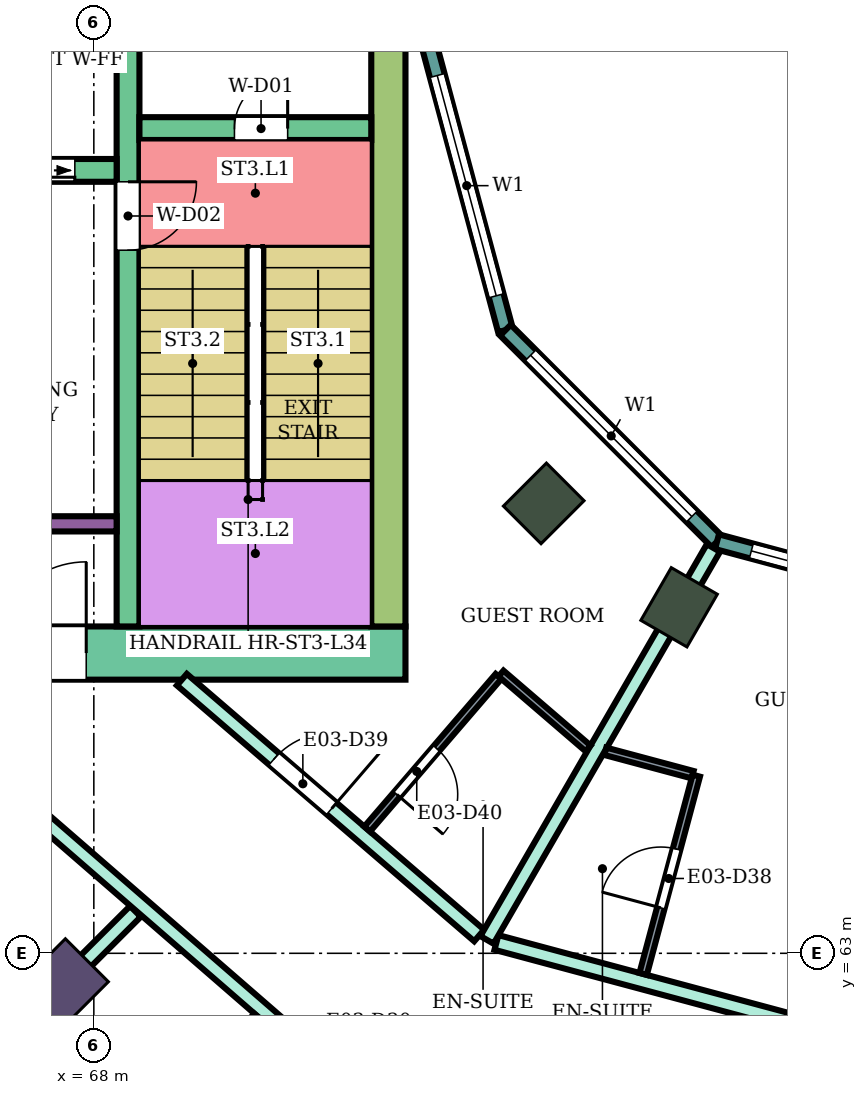
"""IFC4 building model, lengths in metres.
Left out: names, types, materials, properties, quantities, classifications, styles, units other than length and angle.
Written with IfcOpenShell. Run it as: python <this file> out.ifc"""

import sys

from ifc_helpers import new_model, si_unit, direction, frame, frame_2d, origin, origin_2d, place, context, subcontext, project, spatial, rectangle, extrude, element, fill, save


model = new_model("IFC4")
c1 = context("Model", 3, precision=1e-05, world=origin(), true_north=direction((0.0, 1.0)))
c2 = subcontext(c1, "Body", "Model", "MODEL_VIEW")
j1 = project(units=[si_unit("LENGTHUNIT", "METRE"), si_unit("PLANEANGLEUNIT", "RADIAN")], contexts=[c1])
p1 = place(None, origin())
s1 = spatial("IfcSite", under=j1, at=p1, CompositionType="ELEMENT")
p2 = place(p1, origin())
s2 = spatial("IfcBuilding", under=s1, at=p2, CompositionType="ELEMENT")
p3 = place(p2, frame((0.0, 0.0, 145.8)))
s3 = spatial("IfcBuildingStorey", under=s2, at=p3, CompositionType="ELEMENT", Elevation=145.8)
p4 = place(p3, frame((67.555, 62.555, 0.0), z_axis=(0.0, 0.0, 1.0), x_axis=(-0.707106781187, -0.707106781187, 0.0)))
e1 = element("IfcColumn", 1, at=p4, inside=s3, PredefinedType="COLUMN", context=c2, shape_type="SweptSolid", body=[
    extrude(rectangle(XDim=1.0, YDim=0.8, at=origin_2d()), origin(), (0.0, 0.0, 1.0), 3.9),
])
for number, where, z_axis, x_axis in (
    (2, (73.919, 68.919, 0.0), (0.0, 0.0, 1.0), (-0.707, -0.707, 0.0)),
    (3, (75.7, 67.552, 0.0), (0.0, 0.0, 1.0), (-0.5, -0.866, 0.0)),
):
    element("IfcColumn", number, at=place(p3, frame(where, z_axis=z_axis, x_axis=x_axis)), inside=s3, PredefinedType="COLUMN", context=c2, shape_type="SweptSolid", body=[
        extrude(rectangle(XDim=0.8, YDim=0.7, at=origin_2d()), origin(), (0.0, 0.0, 1.0), 3.9),
    ])
p5 = place(p3, frame((72.1, 66.95, 0.0), z_axis=(0.0, 0.0, 1.0), x_axis=(-1.0, 0.0, 0.0)))
e4 = element("IfcWall", 4, at=p5, inside=s3, PredefinedType="SHEAR", context=c2, shape_type="SweptSolid", body=[
    extrude(rectangle(XDim=14.8, YDim=0.7, at=frame_2d((7.4, 0.0))), origin(), (0.0, 0.0, 1.0), 3.5),
])
p6 = place(p5, frame((4.2, 0.0, 0.0)))
e5 = element("IfcOpeningElement", 5, at=p6, cuts=e4, PredefinedType="OPENING", context=c2, shape_type="SweptSolid", body=[
    extrude(rectangle(XDim=2.4, YDim=2.4, at=frame_2d((1.2, 1.2))), frame((0.0, 0.36, 0.0), z_axis=(0.0, -1.0, 0.0), x_axis=(1.0, 0.0, 0.0)), (0.0, 0.0, 1.0), 0.72),
])
p7 = place(p3, frame((71.875, 75.0, 0.0), z_axis=(0.0, 0.0, 1.0), x_axis=(0.0, -1.0, 0.0)))
e6 = element("IfcWall", 6, at=p7, inside=s3, PredefinedType="SHEAR", context=c2, shape_type="SweptSolid", body=[
    extrude(rectangle(XDim=7.7, YDim=0.45, at=frame_2d((3.85, 0.0))), origin(), (0.0, 0.0, 1.0), 3.5),
])
p8 = place(p3, frame((68.45, 75.0, 0.0), z_axis=(0.0, 0.0, 1.0), x_axis=(0.0, -1.0, 0.0)))
e7 = element("IfcWall", 7, at=p8, inside=s3, PredefinedType="SHEAR", context=c2, shape_type="SweptSolid", body=[
    extrude(rectangle(XDim=7.7, YDim=0.3, at=frame_2d((3.85, 0.0))), origin(), (0.0, 0.0, 1.0), 3.5),
])
p9 = place(p8, frame((1.85, 0.0, 0.0)))
e8 = element("IfcOpeningElement", 8, at=p9, cuts=e7, PredefinedType="OPENING", context=c2, shape_type="SweptSolid", body=[
    extrude(rectangle(XDim=0.9, YDim=2.1, at=frame_2d((0.45, 1.05))), frame((0.0, 0.16, 0.0), z_axis=(0.0, -1.0, 0.0), x_axis=(1.0, 0.0, 0.0)), (0.0, 0.0, 1.0), 0.32),
])
p10 = place(p3, frame((71.65, 73.85, 0.0), z_axis=(0.0, 0.0, 1.0), x_axis=(-1.0, 0.0, 0.0)))
e9 = element("IfcWall", 9, at=p10, inside=s3, PredefinedType="SHEAR", context=c2, shape_type="SweptSolid", body=[
    extrude(rectangle(XDim=3.05, YDim=0.3, at=frame_2d((1.525, 0.0))), origin(), (0.0, 0.0, 1.0), 3.5),
])
p11 = place(p10, frame((1.1, 0.0, 0.0)))
e10 = element("IfcOpeningElement", 10, at=p11, cuts=e9, PredefinedType="OPENING", context=c2, shape_type="SweptSolid", body=[
    extrude(rectangle(XDim=0.7, YDim=2.0, at=frame_2d((0.35, 1.0))), frame((0.0, 0.16, 0.0), z_axis=(0.0, -1.0, 0.0), x_axis=(1.0, 0.0, 0.0)), (0.0, 0.0, 1.0), 0.32),
])
p12 = place(p3, frame((68.3, 73.3, 0.0), z_axis=(0.0, 0.0, 1.0), x_axis=(-1.0, 0.0, 0.0)))
e11 = element("IfcWall", 11, at=p12, inside=s3, PredefinedType="SHEAR", context=c2, shape_type="SweptSolid", body=[
    extrude(rectangle(XDim=11.0, YDim=0.3, at=frame_2d((5.5, 0.0))), origin(), (0.0, 0.0, 1.0), 3.5),
])
p13 = place(p12, frame((0.55, 0.0, 0.0)))
e12 = element("IfcOpeningElement", 12, at=p13, cuts=e11, PredefinedType="OPENING", context=c2, shape_type="SweptSolid", body=[
    extrude(rectangle(XDim=1.1, YDim=2.1, at=frame_2d((0.55, 1.05))), frame((0.0, 0.16, 0.0), z_axis=(0.0, -1.0, 0.0), x_axis=(1.0, 0.0, 0.0)), (0.0, 0.0, 1.0), 0.32),
])
p14 = place(p12, frame((8.1, 0.0, 0.0)))
e13 = element("IfcOpeningElement", 13, at=p14, cuts=e11, PredefinedType="OPENING", context=c2, shape_type="SweptSolid", body=[
    extrude(rectangle(XDim=1.0, YDim=2.1, at=frame_2d((0.5, 1.05))), frame((0.0, 0.16, 0.0), z_axis=(0.0, -1.0, 0.0), x_axis=(1.0, 0.0, 0.0)), (0.0, 0.0, 1.0), 0.32),
])
p15 = place(p3, frame((68.3, 68.65, 0.0), z_axis=(0.0, 0.0, 1.0), x_axis=(-1.0, 0.0, 0.0)))
e14 = element("IfcWall", 14, at=p15, inside=s3, PredefinedType="SHEAR", context=c2, shape_type="SweptSolid", body=[
    extrude(rectangle(XDim=4.5, YDim=0.2, at=frame_2d((2.25, 0.0))), origin(), (0.0, 0.0, 1.0), 3.5),
])
p16 = place(p3, frame((72.396, 75.0, 0.0), z_axis=(0.0, 0.0, 1.0), x_axis=(0.258789828301, -0.965933654434, 0.0)))
e15 = element("IfcWall", 15, at=p16, inside=s3, PredefinedType="NOTDEFINED", context=c2, shape_type="SweptSolid", body=[
    extrude(rectangle(XDim=3.936, YDim=0.2, at=frame_2d((1.968, 0.0))), origin(), (0.0, 0.0, 1.0), 3.9),
])
p17 = place(p16, frame((0.468, 0.0, 0.9)))
e16 = element("IfcOpeningElement", 16, at=p17, cuts=e15, PredefinedType="OPENING", context=c2, shape_type="SweptSolid", body=[
    extrude(rectangle(XDim=3.0, YDim=2.3, at=frame_2d((1.5, 1.15))), frame((0.0, 0.11, 0.0), z_axis=(0.0, -1.0, 0.0), x_axis=(1.0, 0.0, 0.0)), (0.0, 0.0, 1.0), 0.22),
])
p18 = place(p3, frame((73.415, 71.198, 0.0), z_axis=(0.0, 0.0, 1.0), x_axis=(0.707106781187, -0.707106781187, 0.0)))
e17 = element("IfcWall", 17, at=p18, inside=s3, PredefinedType="NOTDEFINED", context=c2, shape_type="SweptSolid", body=[
    extrude(rectangle(XDim=3.936, YDim=0.2, at=frame_2d((1.968, 0.0))), origin(), (0.0, 0.0, 1.0), 3.9),
])
p19 = place(p18, frame((0.468, 0.0, 0.9)))
e18 = element("IfcOpeningElement", 18, at=p19, cuts=e17, PredefinedType="OPENING", context=c2, shape_type="SweptSolid", body=[
    extrude(rectangle(XDim=3.0, YDim=2.3, at=frame_2d((1.5, 1.15))), frame((0.0, 0.11, 0.0), z_axis=(0.0, -1.0, 0.0), x_axis=(1.0, 0.0, 0.0)), (0.0, 0.0, 1.0), 0.22),
])
p20 = place(p3, frame((76.198, 68.415, 0.0), z_axis=(0.0, 0.0, 1.0), x_axis=(0.965933654434, -0.258789828301, 0.0)))
e19 = element("IfcWall", 19, at=p20, inside=s3, PredefinedType="NOTDEFINED", context=c2, shape_type="SweptSolid", body=[
    extrude(rectangle(XDim=3.936, YDim=0.2, at=frame_2d((1.968, 0.0))), origin(), (0.0, 0.0, 1.0), 3.9),
])
p21 = place(p20, frame((0.468, 0.0, 0.9)))
e20 = element("IfcOpeningElement", 20, at=p21, cuts=e19, PredefinedType="OPENING", context=c2, shape_type="SweptSolid", body=[
    extrude(rectangle(XDim=3.0, YDim=2.3, at=frame_2d((1.5, 1.15))), frame((0.0, 0.11, 0.0), z_axis=(0.0, -1.0, 0.0), x_axis=(1.0, 0.0, 0.0)), (0.0, 0.0, 1.0), 0.22),
])
p22 = place(p3, frame((63.593, 58.599, 0.0), z_axis=(0.0, 0.0, 1.0), x_axis=(0.707228748718, 0.706984792613, 0.0)))
e21 = element("IfcWall", 21, at=p22, inside=s3, PredefinedType="PARTITIONING", context=c2, shape_type="SweptSolid", body=[
    extrude(rectangle(XDim=7.005, YDim=0.2, at=frame_2d((3.503, 0.0))), origin(), (0.0, 0.0, 1.0), 3.45),
])
p23 = place(p3, frame((67.082, 64.972, 0.0), z_axis=(0.0, 0.0, 1.0), x_axis=(0.755031061605, -0.65568902386, 0.0)))
e22 = element("IfcWall", 22, at=p23, inside=s3, PredefinedType="PARTITIONING", context=c2, shape_type="SweptSolid", body=[
    extrude(rectangle(XDim=6.186, YDim=0.2, at=frame_2d((3.093, 0.0))), origin(), (0.0, 0.0, 1.0), 3.45),
])
p24 = place(p23, frame((4.755, 0.0, 0.0)))
e23 = element("IfcOpeningElement", 23, at=p24, cuts=e22, PredefinedType="OPENING", context=c2, shape_type="SweptSolid", body=[
    extrude(rectangle(XDim=1.0, YDim=2.1, at=frame_2d((0.5, 1.05))), frame((0.0, 0.11, 0.0), z_axis=(0.0, -1.0, 0.0), x_axis=(1.0, 0.0, 0.0)), (0.0, 0.0, 1.0), 0.22),
])
p25 = place(p3, frame((69.158, 66.6, 0.0), z_axis=(0.0, 0.0, 1.0), x_axis=(0.757976058094, -0.652282373943, 0.0)))
e24 = element("IfcWall", 24, at=p25, inside=s3, PredefinedType="PARTITIONING", context=c2, shape_type="SweptSolid", body=[
    extrude(rectangle(XDim=5.16, YDim=0.2, at=frame_2d((2.58, 0.0))), origin(), (0.0, 0.0, 1.0), 3.45),
])
p26 = place(p25, frame((1.6, 0.0, 0.0)))
e25 = element("IfcOpeningElement", 25, at=p26, cuts=e24, PredefinedType="OPENING", context=c2, shape_type="SweptSolid", body=[
    extrude(rectangle(XDim=1.0, YDim=2.1, at=frame_2d((0.5, 1.05))), frame((0.0, 0.11, 0.0), z_axis=(0.0, -1.0, 0.0), x_axis=(1.0, 0.0, 0.0)), (0.0, 0.0, 1.0), 0.22),
])
p27 = place(p3, frame((73.297, 63.143, 0.0), z_axis=(0.0, 0.0, 1.0), x_axis=(0.965859030528, -0.25906820173, 0.0)))
e26 = element("IfcWall", 26, at=p27, inside=s3, PredefinedType="PARTITIONING", context=c2, shape_type="SweptSolid", body=[
    extrude(rectangle(XDim=6.81, YDim=0.2, at=frame_2d((3.405, 0.0))), origin(), (0.0, 0.0, 1.0), 3.45),
])
p28 = place(p27, frame((5.39, 0.0, 0.0)))
e27 = element("IfcOpeningElement", 27, at=p28, cuts=e26, PredefinedType="OPENING", context=c2, shape_type="SweptSolid", body=[
    extrude(rectangle(XDim=1.0, YDim=2.1, at=frame_2d((0.5, 1.05))), frame((0.0, 0.11, 0.0), z_axis=(0.0, -1.0, 0.0), x_axis=(1.0, 0.0, 0.0)), (0.0, 0.0, 1.0), 0.22),
])
p29 = place(p3, frame((73.173, 63.176, 0.0), z_axis=(0.0, 0.0, 1.0), x_axis=(0.500239348149, 0.865887171959, 0.0)))
e28 = element("IfcWall", 28, at=p29, inside=s3, PredefinedType="PARTITIONING", context=c2, shape_type="SweptSolid", body=[
    extrude(rectangle(XDim=5.955, YDim=0.2, at=frame_2d((2.978, 0.0))), origin(), (0.0, 0.0, 1.0), 3.45),
])
p30 = place(p3, frame((65.208, 62.875, 0.0), z_axis=(0.0, 0.0, 1.0), x_axis=(0.757943251005, -0.652320495045, 0.0)))
e29 = element("IfcWall", 29, at=p30, inside=s3, PredefinedType="PARTITIONING", context=c2, shape_type="SweptSolid", body=[
    extrude(rectangle(XDim=4.151, YDim=0.1, at=frame_2d((2.076, 0.0))), origin(), (0.0, 0.0, 1.0), 3.45),
])
p31 = place(p3, frame((68.393, 60.135, 0.0), z_axis=(0.0, 0.0, 1.0), x_axis=(0.652061182569, 0.758166349944, 0.0)))
e30 = element("IfcWall", 30, at=p31, inside=s3, PredefinedType="PARTITIONING", context=c2, shape_type="SweptSolid", body=[
    extrude(rectangle(XDim=2.69, YDim=0.1, at=frame_2d((1.345, 0.0))), origin(), (0.0, 0.0, 1.0), 3.45),
])
p32 = place(p31, frame((1.0, 0.0, 0.0)))
e31 = element("IfcOpeningElement", 31, at=p32, cuts=e30, PredefinedType="OPENING", context=c2, shape_type="SweptSolid", body=[
    extrude(rectangle(XDim=0.8, YDim=2.1, at=frame_2d((0.4, 1.05))), frame((0.0, 0.06, 0.0), z_axis=(0.0, -1.0, 0.0), x_axis=(1.0, 0.0, 0.0)), (0.0, 0.0, 1.0), 0.12),
])
p33 = place(p3, frame((71.596, 64.635, 0.0), z_axis=(0.0, 0.0, 1.0), x_axis=(0.652285007511, 0.757973791748, 0.0)))
e32 = element("IfcWall", 32, at=p33, inside=s3, PredefinedType="PARTITIONING", context=c2, shape_type="SweptSolid", body=[
    extrude(rectangle(XDim=2.65, YDim=0.1, at=frame_2d((1.325, 0.0))), origin(), (0.0, 0.0, 1.0), 3.45),
])
p34 = place(p33, frame((0.6, 0.0, 0.0)))
e33 = element("IfcOpeningElement", 33, at=p34, cuts=e32, PredefinedType="OPENING", context=c2, shape_type="SweptSolid", body=[
    extrude(rectangle(XDim=0.8, YDim=2.1, at=frame_2d((0.4, 1.05))), frame((0.0, 0.06, 0.0), z_axis=(0.0, -1.0, 0.0), x_axis=(1.0, 0.0, 0.0)), (0.0, 0.0, 1.0), 0.12),
])
p35 = place(p3, frame((73.357, 66.681, 0.0), z_axis=(0.0, 0.0, 1.0), x_axis=(0.758263469747, -0.651948242154, 0.0)))
e34 = element("IfcWall", 34, at=p35, inside=s3, PredefinedType="PARTITIONING", context=c2, shape_type="SweptSolid", body=[
    extrude(rectangle(XDim=1.511, YDim=0.1, at=frame_2d((0.755, 0.0))), origin(), (0.0, 0.0, 1.0), 3.45),
])
p36 = place(p3, frame((74.729, 65.657, 0.0), z_axis=(0.0, 0.0, 1.0), x_axis=(0.965948051503, -0.258736085224, 0.0)))
e35 = element("IfcWall", 35, at=p36, inside=s3, PredefinedType="PARTITIONING", context=c2, shape_type="SweptSolid", body=[
    extrude(rectangle(XDim=1.189, YDim=0.1, at=frame_2d((0.594, 0.0))), origin(), (0.0, 0.0, 1.0), 3.45),
])
p37 = place(p3, frame((75.227, 62.729, 0.0), z_axis=(0.0, 0.0, 1.0), x_axis=(0.258945475746, 0.965891940432, 0.0)))
e36 = element("IfcWall", 36, at=p37, inside=s3, PredefinedType="PARTITIONING", context=c2, shape_type="SweptSolid", body=[
    extrude(rectangle(XDim=2.7, YDim=0.1, at=frame_2d((1.35, 0.0))), origin(), (0.0, 0.0, 1.0), 3.45),
])
p38 = place(p37, frame((0.9, 0.0, 0.0)))
e37 = element("IfcOpeningElement", 37, at=p38, cuts=e36, PredefinedType="OPENING", context=c2, shape_type="SweptSolid", body=[
    extrude(rectangle(XDim=0.8, YDim=2.1, at=frame_2d((0.4, 1.05))), frame((0.0, 0.06, 0.0), z_axis=(0.0, -1.0, 0.0), x_axis=(1.0, 0.0, 0.0)), (0.0, 0.0, 1.0), 0.12),
])
p39 = place(p17, origin())
e38 = element("IfcWindow", 38, at=p39, inside=s3, PartitioningType="SINGLE_PANEL", PredefinedType="WINDOW", context=c2, shape_type="SweptSolid", body=[
    extrude(rectangle(XDim=3.0, YDim=2.3, at=frame_2d((1.5, 1.15))), frame((0.0, 0.03, 0.0), z_axis=(0.0, -1.0, 0.0), x_axis=(1.0, 0.0, 0.0)), (0.0, 0.0, 1.0), 0.06),
])
fill(e16, e38)
p40 = place(p19, origin())
e39 = element("IfcWindow", 39, at=p40, inside=s3, PartitioningType="SINGLE_PANEL", PredefinedType="WINDOW", context=c2, shape_type="SweptSolid", body=[
    extrude(rectangle(XDim=3.0, YDim=2.3, at=frame_2d((1.5, 1.15))), frame((0.0, 0.03, 0.0), z_axis=(0.0, -1.0, 0.0), x_axis=(1.0, 0.0, 0.0)), (0.0, 0.0, 1.0), 0.06),
])
fill(e18, e39)
p41 = place(p21, origin())
e40 = element("IfcWindow", 40, at=p41, inside=s3, PartitioningType="SINGLE_PANEL", PredefinedType="WINDOW", context=c2, shape_type="SweptSolid", body=[
    extrude(rectangle(XDim=3.0, YDim=2.3, at=frame_2d((1.5, 1.15))), frame((0.0, 0.03, 0.0), z_axis=(0.0, -1.0, 0.0), x_axis=(1.0, 0.0, 0.0)), (0.0, 0.0, 1.0), 0.06),
])
fill(e20, e40)
p42 = place(p38, origin())
e41 = element("IfcDoor", 41, at=p42, inside=s3, OperationType="SINGLE_SWING_LEFT", PredefinedType="DOOR", context=c2, shape_type="SweptSolid", body=[
    extrude(rectangle(XDim=0.8, YDim=2.1, at=frame_2d((0.4, 1.05))), frame((0.0, 0.025, 0.0), z_axis=(0.0, -1.0, 0.0), x_axis=(1.0, 0.0, 0.0)), (0.0, 0.0, 1.0), 0.05),
])
fill(e37, e41)
p43 = place(p26, origin())
e42 = element("IfcDoor", 42, at=p43, inside=s3, OperationType="SINGLE_SWING_RIGHT", PredefinedType="DOOR", context=c2, shape_type="SweptSolid", body=[
    extrude(rectangle(XDim=1.0, YDim=2.1, at=frame_2d((0.5, 1.05))), frame((0.0, 0.025, 0.0), z_axis=(0.0, -1.0, 0.0), x_axis=(1.0, 0.0, 0.0)), (0.0, 0.0, 1.0), 0.05),
])
fill(e25, e42)
p44 = place(p34, frame((0.8, 0.0, 0.0), z_axis=(0.0, 0.0, 1.0), x_axis=(-1.0, 0.0, 0.0)))
e43 = element("IfcDoor", 43, at=p44, inside=s3, OperationType="SINGLE_SWING_RIGHT", PredefinedType="DOOR", context=c2, shape_type="SweptSolid", body=[
    extrude(rectangle(XDim=0.8, YDim=2.1, at=frame_2d((0.4, 1.05))), frame((0.0, 0.025, 0.0), z_axis=(0.0, -1.0, 0.0), x_axis=(1.0, 0.0, 0.0)), (0.0, 0.0, 1.0), 0.05),
])
fill(e33, e43)
p45 = place(p11, frame((0.7, 0.0, 0.0), z_axis=(0.0, 0.0, 1.0), x_axis=(-1.0, 0.0, 0.0)))
e44 = element("IfcDoor", 44, at=p45, inside=s3, OperationType="SINGLE_SWING_RIGHT", PredefinedType="DOOR", context=c2, shape_type="SweptSolid", body=[
    extrude(rectangle(XDim=0.7, YDim=2.0, at=frame_2d((0.35, 1.0))), frame((0.0, 0.025, 0.0), z_axis=(0.0, -1.0, 0.0), x_axis=(1.0, 0.0, 0.0)), (0.0, 0.0, 1.0), 0.05),
])
fill(e10, e44)
p46 = place(p9, origin())
e45 = element("IfcDoor", 45, at=p46, inside=s3, OperationType="SINGLE_SWING_LEFT", PredefinedType="DOOR", context=c2, shape_type="SweptSolid", body=[
    extrude(rectangle(XDim=0.9, YDim=2.1, at=frame_2d((0.45, 1.05))), frame((0.0, 0.025, 0.0), z_axis=(0.0, -1.0, 0.0), x_axis=(1.0, 0.0, 0.0)), (0.0, 0.0, 1.0), 0.05),
])
fill(e8, e45)
p47 = place(p13, origin())
e46 = element("IfcDoor", 46, at=p47, inside=s3, OperationType="DOUBLE_DOOR_SLIDING", PredefinedType="DOOR", context=c2, shape_type="SweptSolid", body=[
    extrude(rectangle(XDim=1.1, YDim=2.1, at=frame_2d((0.55, 1.05))), frame((0.0, 0.025, 0.0), z_axis=(0.0, -1.0, 0.0), x_axis=(1.0, 0.0, 0.0)), (0.0, 0.0, 1.0), 0.05),
])
fill(e12, e46)
p48 = place(p6, frame((2.4, 0.0, 0.0), z_axis=(0.0, 0.0, 1.0), x_axis=(-1.0, 0.0, 0.0)))
e47 = element("IfcDoor", 47, at=p48, inside=s3, OperationType="DOUBLE_DOOR_SINGLE_SWING", PredefinedType="DOOR", context=c2, shape_type="SweptSolid", body=[
    extrude(rectangle(XDim=2.4, YDim=2.4, at=frame_2d((1.2, 1.2))), frame((0.0, 0.025, 0.0), z_axis=(0.0, -1.0, 0.0), x_axis=(1.0, 0.0, 0.0)), (0.0, 0.0, 1.0), 0.05),
])
fill(e5, e47)
save(model, sys.argv[1])
